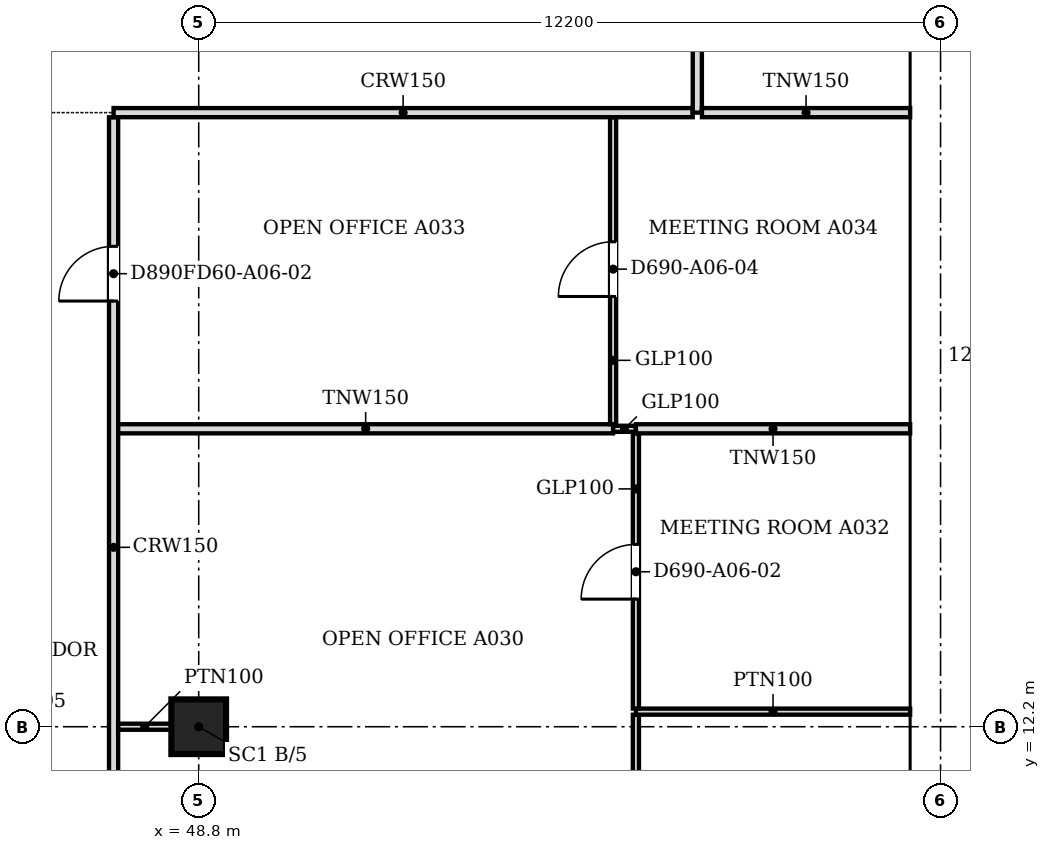
"""IFC4 building model, lengths in metres.
Left out: names, types, materials, properties, quantities, classifications, styles, units other than length and angle.
Written with IfcOpenShell. Run it as: python <this file> out.ifc"""

import sys

from ifc_helpers import new_model, si_unit, direction, frame, frame_2d, origin, origin_2d, place, context, subcontext, project, spatial, polyline, rectangle, outline, extrude, faceted_brep, source, transform, mapped, element, fill, save


model = new_model("IFC4")
c1 = context("Model", 3, precision=1e-05, world=origin(), true_north=direction((0.0, 1.0)))
c2 = subcontext(c1, "Body", "Model", "MODEL_VIEW")
j1 = project(units=[si_unit("LENGTHUNIT", "METRE"), si_unit("PLANEANGLEUNIT", "RADIAN")], contexts=[c1])
p1 = place(None, origin())
s1 = spatial("IfcSite", under=j1, at=p1, CompositionType="ELEMENT")
p2 = place(p1, origin())
s2 = spatial("IfcBuilding", under=s1, at=p2, CompositionType="ELEMENT")
p3 = place(p2, frame((0.0, 0.0, 72.4)))
s3 = spatial("IfcBuildingStorey", under=s2, at=p3, CompositionType="ELEMENT", Elevation=72.4)
p4 = place(p3, frame((48.8, 12.2, 0.0), z_axis=(0.0, 0.0, 1.0), x_axis=(1.0, 0.0, 0.0)))
e1 = element("IfcColumn", 1, at=p4, inside=s3, PredefinedType="COLUMN", context=c2, shape_type="SweptSolid", body=[
    extrude(rectangle(XDim=0.9, YDim=0.9, at=origin_2d()), origin(), (0.0, 0.0, 1.0), 3.6),
])
m1 = source(origin(), c2, "Body", "SweptSolid", [
    extrude(outline(polyline([(3.05, 0.0), (6.1, 3.8), (3.05, 7.6), (0.0, 3.8), (3.05, 0.0)])), frame((0.0, 0.25, 0.0), z_axis=(0.0, -1.0, 0.0), x_axis=(1.0, 0.0, 0.0)), (0.0, 0.0, 1.0), 0.5),
])
p5 = place(p3, frame((60.75, 9.15, -3.8), z_axis=(0.0, 0.0, 1.0), x_axis=(0.0, 1.0, 0.0)))
e2 = element("IfcWall", 2, at=p5, inside=s3, PredefinedType="SOLIDWALL", context=c2, shape_type="MappedRepresentation", body=[
    mapped(m1, transform((0.0, 0.0, 0.0), scale=1.0)),
])
m2 = source(origin(), c2, "Body", "SweptSolid", [
    extrude(outline(polyline([(3.05, 0.399), (5.78, 3.8), (3.05, 7.2), (0.321, 3.8), (3.05, 0.399)])), frame((0.0, 0.26, 0.0), z_axis=(0.0, -1.0, 0.0), x_axis=(1.0, 0.0, 0.0)), (0.0, 0.0, 1.0), 0.52),
])
p6 = place(p5, origin())
e3 = element("IfcOpeningElement", 3, at=p6, cuts=e2, PredefinedType="OPENING", context=c2, shape_type="MappedRepresentation", body=[
    mapped(m2, transform((0.0, 0.0, 0.0), scale=1.0)),
])
p7 = place(p3, frame((60.75, 15.25, -3.8), z_axis=(0.0, 0.0, 1.0), x_axis=(0.0, 1.0, 0.0)))
e4 = element("IfcWall", 4, at=p7, inside=s3, PredefinedType="SOLIDWALL", context=c2, shape_type="MappedRepresentation", body=[
    mapped(m1, transform((0.0, 0.0, 0.0), scale=1.0)),
])
p8 = place(p7, origin())
e5 = element("IfcOpeningElement", 5, at=p8, cuts=e4, PredefinedType="OPENING", context=c2, shape_type="MappedRepresentation", body=[
    mapped(m2, transform((0.0, 0.0, 0.0), scale=1.0)),
])
m3 = source(origin(), c2, "Body", "Brep", [
    faceted_brep([(3.05, -0.25, 0.0), (6.1, -0.25, 3.8), (6.1, -0.25, 3.8), (3.05, -0.25, 7.6), (0.0, -0.25, 3.8), (0.0, 0.25, 3.8), (3.05, 0.25, 7.6), (6.1, 0.25, 3.8), (6.1, 0.25, 3.8), (3.05, 0.25, 0.0)], [[[0, 1, 2, 3, 4]], [[5, 6, 7, 8, 9]], [[9, 8, 1, 0]], [[7, 6, 3, 2]], [[6, 5, 4, 3]], [[5, 9, 0, 4]], [[1, 8, 7, 2]]]),
])
p9 = place(p3, frame((60.75, 21.35, -3.8), z_axis=(0.0, 0.0, 1.0), x_axis=(0.0, 1.0, 0.0)))
e6 = element("IfcWall", 6, at=p9, inside=s3, PredefinedType="SOLIDWALL", context=c2, shape_type="MappedRepresentation", body=[
    mapped(m3, transform((0.0, 0.0, 0.0), scale=1.0)),
])
p10 = place(p9, origin())
e7 = element("IfcOpeningElement", 7, at=p10, cuts=e6, PredefinedType="OPENING", context=c2, shape_type="MappedRepresentation", body=[
    mapped(m2, transform((0.0, 0.0, 0.0), scale=1.0)),
])
p11 = place(p2, frame((0.0, 0.0, 76.2)))
s4 = spatial("IfcBuildingStorey", under=s2, at=p11, CompositionType="ELEMENT", Elevation=76.2)
m4 = source(origin(), c2, "Body", "Brep", [
    faceted_brep([(3.003, -0.25, 0.0), (6.053, -0.25, 3.8), (3.003, -0.25, 7.6), (0.0, -0.25, 3.8), (0.047, 0.25, 3.859), (3.003, 0.25, 7.6), (6.053, 0.25, 3.8), (3.003, 0.25, 0.0), (0.047, 0.25, 3.741), (0.0, 0.0, 3.8)], [[[0, 1, 2, 3]], [[4, 5, 6, 7, 8]], [[7, 6, 1, 0]], [[6, 5, 2, 1]], [[5, 4, 9, 3, 2]], [[8, 7, 0, 3, 9]], [[8, 9, 4]]]),
])
p12 = place(p11, frame((60.75, 6.146, -3.8), z_axis=(0.0, 0.0, 1.0), x_axis=(0.0, 1.0, 0.0)))
e8 = element("IfcWall", 8, at=p12, inside=s4, PredefinedType="SOLIDWALL", context=c2, shape_type="MappedRepresentation", body=[
    mapped(m4, transform((0.0, 0.0, 0.0), scale=1.0)),
])
m5 = source(origin(), c2, "Body", "SweptSolid", [
    extrude(outline(polyline([(3.005, 0.401), (5.733, 3.8), (3.005, 7.199), (0.319, 3.8), (3.005, 0.401)])), frame((0.0, 0.26, 0.0), z_axis=(0.0, -1.0, 0.0), x_axis=(1.0, 0.0, 0.0)), (0.0, 0.0, 1.0), 0.52),
])
p13 = place(p12, origin())
e9 = element("IfcOpeningElement", 9, at=p13, cuts=e8, PredefinedType="OPENING", context=c2, shape_type="MappedRepresentation", body=[
    mapped(m5, transform((0.0, 0.0, 0.0), scale=1.0)),
])
m6 = source(origin(), c2, "Body", "SweptSolid", [
    extrude(outline(polyline([(3.05, 0.0), (6.1, 3.8), (3.05, 7.6), (0.0, 3.8), (3.05, 0.0)])), frame((0.0, 0.25, 0.0), z_axis=(0.0, -1.0, 0.0), x_axis=(1.0, 0.0, 0.0)), (0.0, 0.0, 1.0), 0.5),
])
p14 = place(p11, frame((60.75, 12.2, -3.8), z_axis=(0.0, 0.0, 1.0), x_axis=(0.0, 1.0, 0.0)))
e10 = element("IfcWall", 10, at=p14, inside=s4, PredefinedType="SOLIDWALL", context=c2, shape_type="MappedRepresentation", body=[
    mapped(m6, transform((0.0, 0.0, 0.0), scale=1.0)),
])
m7 = source(origin(), c2, "Body", "SweptSolid", [
    extrude(outline(polyline([(3.05, 0.399), (5.78, 3.8), (3.05, 7.201), (0.321, 3.8), (3.05, 0.399)])), frame((0.0, 0.26, 0.0), z_axis=(0.0, -1.0, 0.0), x_axis=(1.0, 0.0, 0.0)), (0.0, 0.0, 1.0), 0.52),
])
p15 = place(p14, origin())
e11 = element("IfcOpeningElement", 11, at=p15, cuts=e10, PredefinedType="OPENING", context=c2, shape_type="MappedRepresentation", body=[
    mapped(m7, transform((0.0, 0.0, 0.0), scale=1.0)),
])
m8 = source(origin(), c2, "Body", "Brep", [
    faceted_brep([(3.05, -0.25, 0.0), (6.1, -0.25, 3.8), (6.1, -0.25, 3.8), (3.05, -0.25, 7.6), (0.0, -0.25, 3.8), (0.0, 0.25, 3.8), (3.05, 0.25, 7.6), (6.1, 0.25, 3.8), (6.1, 0.25, 3.8), (3.05, 0.25, 0.0)], [[[0, 1, 2, 3, 4]], [[5, 6, 7, 8, 9]], [[9, 8, 1, 0]], [[7, 6, 3, 2]], [[6, 5, 4, 3]], [[5, 9, 0, 4]], [[1, 8, 7, 2]]]),
])
p16 = place(p11, frame((60.75, 18.3, -3.8), z_axis=(0.0, 0.0, 1.0), x_axis=(0.0, 1.0, 0.0)))
e12 = element("IfcWall", 12, at=p16, inside=s4, PredefinedType="SOLIDWALL", context=c2, shape_type="MappedRepresentation", body=[
    mapped(m8, transform((0.0, 0.0, 0.0), scale=1.0)),
])
p17 = place(p16, origin())
e13 = element("IfcOpeningElement", 13, at=p17, cuts=e12, PredefinedType="OPENING", context=c2, shape_type="MappedRepresentation", body=[
    mapped(m7, transform((0.0, 0.0, 0.0), scale=1.0)),
])
p18 = place(p3, frame((47.4, 22.224, 0.0), z_axis=(0.0, 0.0, 1.0), x_axis=(0.0, -1.0, 0.0)))
e14 = element("IfcWall", 14, at=p18, inside=s3, PredefinedType="PARTITIONING", context=c2, shape_type="SweptSolid", body=[
    extrude(rectangle(XDim=18.024, YDim=0.15, at=frame_2d((9.012, 0.0))), origin(), (0.0, 0.0, 1.0), 3.067),
])
m9 = source(origin(), c2, "Body", "SweptSolid", [
    extrude(rectangle(XDim=0.9, YDim=2.1, at=frame_2d((0.45, 1.05))), frame((0.0, 0.085, 0.0), z_axis=(0.0, -1.0, 0.0), x_axis=(1.0, 0.0, 0.0)), (0.0, 0.0, 1.0), 0.17),
])
p19 = place(p18, frame((2.123, 0.0, 0.0)))
e15 = element("IfcOpeningElement", 15, at=p19, cuts=e14, PredefinedType="OPENING", context=c2, shape_type="MappedRepresentation", body=[
    mapped(m9, transform((0.0, 0.0, 0.0), scale=1.0)),
])
p20 = place(p18, frame((11.124, 0.0, 0.0)))
e16 = element("IfcOpeningElement", 16, at=p20, cuts=e14, PredefinedType="OPENING", context=c2, shape_type="MappedRepresentation", body=[
    mapped(m9, transform((0.0, 0.0, 0.0), scale=1.0)),
])
p21 = place(p3, frame((55.99, 12.397, 0.0), z_axis=(0.0, 0.0, 1.0), x_axis=(0.0, -1.0, 0.0)))
e17 = element("IfcWall", 17, at=p21, inside=s3, PredefinedType="PARTITIONING", context=c2, shape_type="SweptSolid", body=[
    extrude(rectangle(XDim=4.297, YDim=0.1, at=frame_2d((2.148, 0.0))), origin(), (0.0, 0.0, 1.0), 3.067),
])
m10 = source(origin(), c2, "Body", "SweptSolid", [
    extrude(rectangle(XDim=0.9, YDim=2.1, at=frame_2d((0.45, 1.05))), frame((0.0, 0.06, 0.0), z_axis=(0.0, -1.0, 0.0), x_axis=(1.0, 0.0, 0.0)), (0.0, 0.0, 1.0), 0.12),
])
p22 = place(p21, frame((1.697, 0.0, 0.0)))
e18 = element("IfcOpeningElement", 18, at=p22, cuts=e17, PredefinedType="OPENING", context=c2, shape_type="MappedRepresentation", body=[
    mapped(m10, transform((0.0, 0.0, 0.0), scale=1.0)),
])
p23 = place(p3, frame((48.35, 12.2, 0.0), z_axis=(0.0, 0.0, 1.0), x_axis=(-1.0, 0.0, 0.0)))
e19 = element("IfcWall", 19, at=p23, inside=s3, PredefinedType="PARTITIONING", context=c2, shape_type="SweptSolid", body=[
    extrude(rectangle(XDim=0.875, YDim=0.1, at=frame_2d((0.438, 0.0))), origin(), (0.0, 0.0, 1.0), 3.067),
])
p24 = place(p3, frame((55.99, 12.448, 0.0), z_axis=(0.0, 0.0, 1.0), x_axis=(1.0, 0.0, 0.0)))
e20 = element("IfcWall", 20, at=p24, inside=s3, PredefinedType="PARTITIONING", context=c2, shape_type="SweptSolid", body=[
    extrude(rectangle(XDim=4.51, YDim=0.1, at=frame_2d((2.255, 0.0))), origin(), (0.0, 0.0, 1.0), 3.067),
])
p25 = place(p3, frame((55.99, 17.024, 0.0), z_axis=(0.0, 0.0, 1.0), x_axis=(0.0, -1.0, 0.0)))
e21 = element("IfcWall", 21, at=p25, inside=s3, PredefinedType="PARTITIONING", context=c2, shape_type="SweptSolid", body=[
    extrude(rectangle(XDim=4.525, YDim=0.1, at=frame_2d((2.263, 0.0))), origin(), (0.0, 0.0, 1.0), 3.067),
])
p26 = place(p25, frame((1.825, 0.0, 0.0)))
e22 = element("IfcOpeningElement", 22, at=p26, cuts=e21, PredefinedType="OPENING", context=c2, shape_type="MappedRepresentation", body=[
    mapped(m10, transform((0.0, 0.0, 0.0), scale=1.0)),
])
p27 = place(p3, frame((47.476, 17.1, 0.0), z_axis=(0.0, 0.0, 1.0), x_axis=(1.0, 0.0, 0.0)))
e23 = element("IfcWall", 23, at=p27, inside=s3, PredefinedType="PARTITIONING", context=c2, shape_type="SweptSolid", body=[
    extrude(rectangle(XDim=8.139, YDim=0.15, at=frame_2d((4.069, 0.0))), origin(), (0.0, 0.0, 1.0), 3.067),
])
p28 = place(p3, frame((55.616, 17.1, 0.0), z_axis=(0.0, 0.0, 1.0), x_axis=(1.0, 0.0, 0.0)))
e24 = element("IfcWall", 24, at=p28, inside=s3, PredefinedType="PARTITIONING", context=c2, shape_type="SweptSolid", body=[
    extrude(rectangle(XDim=0.373, YDim=0.1, at=frame_2d((0.187, 0.0))), origin(), (0.0, 0.0, 1.0), 3.067),
])
p29 = place(p3, frame((55.99, 17.1, 0.0), z_axis=(0.0, 0.0, 1.0), x_axis=(1.0, 0.0, 0.0)))
e25 = element("IfcWall", 25, at=p29, inside=s3, PredefinedType="PARTITIONING", context=c2, shape_type="SweptSolid", body=[
    extrude(rectangle(XDim=4.51, YDim=0.15, at=frame_2d((2.255, 0.0))), origin(), (0.0, 0.0, 1.0), 3.067),
])
p30 = place(p3, frame((55.615, 22.224, 0.0), z_axis=(0.0, 0.0, 1.0), x_axis=(0.0, -1.0, 0.0)))
e26 = element("IfcWall", 26, at=p30, inside=s3, PredefinedType="PARTITIONING", context=c2, shape_type="SweptSolid", body=[
    extrude(rectangle(XDim=5.048, YDim=0.1, at=frame_2d((2.524, 0.0))), origin(), (0.0, 0.0, 1.0), 3.067),
])
p31 = place(p30, frame((2.048, 0.0, 0.0)))
e27 = element("IfcOpeningElement", 27, at=p31, cuts=e26, PredefinedType="OPENING", context=c2, shape_type="MappedRepresentation", body=[
    mapped(m10, transform((0.0, 0.0, 0.0), scale=1.0)),
])
p32 = place(p3, frame((47.4, 22.3, 0.0), z_axis=(0.0, 0.0, 1.0), x_axis=(1.0, 0.0, 0.0)))
e28 = element("IfcWall", 28, at=p32, inside=s3, PredefinedType="PARTITIONING", context=c2, shape_type="SweptSolid", body=[
    extrude(rectangle(XDim=9.524, YDim=0.15, at=frame_2d((4.762, 0.0))), origin(), (0.0, 0.0, 1.0), 3.067),
])
p33 = place(p3, frame((57.0, 30.6, 0.0), z_axis=(0.0, 0.0, 1.0), x_axis=(0.0, -1.0, 0.0)))
e29 = element("IfcWall", 29, at=p33, inside=s3, PredefinedType="PARTITIONING", context=c2, shape_type="SweptSolid", body=[
    extrude(rectangle(XDim=8.3, YDim=0.15, at=frame_2d((4.15, 0.0))), origin(), (0.0, 0.0, 1.0), 3.067),
])
p34 = place(p33, frame((3.7, 0.0, 0.0)))
e30 = element("IfcOpeningElement", 30, at=p34, cuts=e29, PredefinedType="OPENING", context=c2, shape_type="MappedRepresentation", body=[
    mapped(m9, transform((0.0, 0.0, 0.0), scale=1.0)),
])
p35 = place(p3, frame((57.076, 22.3, 0.0), z_axis=(0.0, 0.0, 1.0), x_axis=(1.0, 0.0, 0.0)))
e31 = element("IfcWall", 31, at=p35, inside=s3, PredefinedType="PARTITIONING", context=c2, shape_type="SweptSolid", body=[
    extrude(rectangle(XDim=3.424, YDim=0.15, at=frame_2d((1.712, 0.0))), origin(), (0.0, 0.0, 1.0), 3.067),
])
m11 = source(origin(), c2, "Body", "SweptSolid", [
    extrude(rectangle(XDim=0.9, YDim=2.1, at=frame_2d((0.45, 1.05))), frame((0.0, 0.025, 0.0), z_axis=(0.0, -1.0, 0.0), x_axis=(1.0, 0.0, 0.0)), (0.0, 0.0, 1.0), 0.05),
])
p36 = place(p26, origin())
e32 = element("IfcDoor", 32, at=p36, inside=s3, OperationType="SINGLE_SWING_RIGHT", PredefinedType="DOOR", context=c2, shape_type="MappedRepresentation", body=[
    mapped(m11, transform((0.0, 0.0, 0.0), scale=1.0)),
])
fill(e22, e32)
p37 = place(p31, origin())
e33 = element("IfcDoor", 33, at=p37, inside=s3, OperationType="SINGLE_SWING_RIGHT", PredefinedType="DOOR", context=c2, shape_type="MappedRepresentation", body=[
    mapped(m11, transform((0.0, 0.0, 0.0), scale=1.0)),
])
fill(e27, e33)
p38 = place(p19, origin())
e34 = element("IfcDoor", 34, at=p38, inside=s3, OperationType="SINGLE_SWING_RIGHT", PredefinedType="DOOR", context=c2, shape_type="MappedRepresentation", body=[
    mapped(m11, transform((0.0, 0.0, 0.0), scale=1.0)),
])
fill(e15, e34)
save(model, sys.argv[1])
